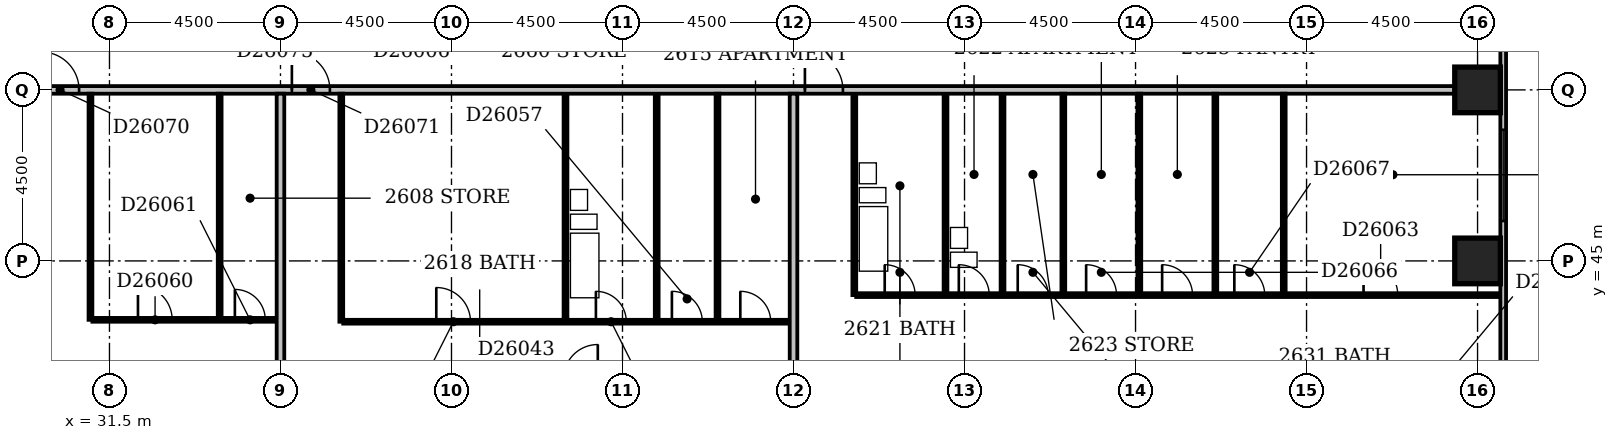
"""IFC4 building model, lengths in metres.
Left out: names, types, materials, properties, quantities, classifications, styles, units other than length and angle.
Written with IfcOpenShell. Run it as: python <this file> out.ifc"""

import sys

from ifc_helpers import new_model, si_unit, direction, frame, frame_2d, origin, origin_2d, place, context, subcontext, project, spatial, rectangle, extrude, element, fill, save


model = new_model("IFC4")
c1 = context("Model", 3, precision=1e-05, world=origin(), true_north=direction((0.0, 1.0)))
c2 = subcontext(c1, "Body", "Model", "MODEL_VIEW")
j1 = project(units=[si_unit("LENGTHUNIT", "METRE"), si_unit("PLANEANGLEUNIT", "RADIAN")], contexts=[c1])
p1 = place(None, origin())
s1 = spatial("IfcSite", under=j1, at=p1, CompositionType="ELEMENT")
p2 = place(p1, origin())
s2 = spatial("IfcBuilding", under=s1, at=p2, CompositionType="ELEMENT")
p3 = place(p2, frame((0.0, 0.0, 104.6)))
s3 = spatial("IfcBuildingStorey", under=s2, at=p3, CompositionType="ELEMENT", Elevation=104.6)
for number, where, z_axis, x_axis in (
    (1, (67.5, 45.0, -0.3), (0.0, 0.0, 1.0), (1.0, 0.0, 0.0)),
    (2, (67.5, 49.5, -0.3), (0.0, 0.0, 1.0), (1.0, 0.0, 0.0)),
):
    element("IfcColumn", number, at=place(p3, frame(where, z_axis=z_axis, x_axis=x_axis)), inside=s3, PredefinedType="COLUMN", context=c2, shape_type="SweptSolid", body=[
        extrude(rectangle(XDim=1.2, YDim=1.2, at=origin_2d()), origin(), (0.0, 0.0, 1.0), 3.45),
    ])
p4 = place(p3, frame((68.175, 35.4, 0.0), z_axis=(0.0, 0.0, 1.0), x_axis=(0.0, 1.0, 0.0)))
e3 = element("IfcWall", 3, at=p4, inside=s3, PredefinedType="STANDARD", context=c2, shape_type="SweptSolid", body=[
    extrude(rectangle(XDim=23.85, YDim=0.15, at=frame_2d((11.925, 0.0))), origin(), (0.0, 0.0, 1.0), 2.5),
])
p5 = place(p4, frame((1.65, 0.0, 0.6)))
e4 = element("IfcOpeningElement", 4, at=p5, cuts=e3, PredefinedType="OPENING", context=c2, shape_type="SweptSolid", body=[
    extrude(rectangle(XDim=2.4, YDim=1.8, at=frame_2d((1.2, 0.9))), frame((0.0, 0.087, 0.0), z_axis=(0.0, -1.0, 0.0), x_axis=(1.0, 0.0, 0.0)), (0.0, 0.0, 1.0), 0.174),
])
p6 = place(p4, frame((10.65, 0.0, 0.6)))
e5 = element("IfcOpeningElement", 5, at=p6, cuts=e3, PredefinedType="OPENING", context=c2, shape_type="SweptSolid", body=[
    extrude(rectangle(XDim=2.4, YDim=1.8, at=frame_2d((1.2, 0.9))), frame((0.0, 0.087, 0.0), z_axis=(0.0, -1.0, 0.0), x_axis=(1.0, 0.0, 0.0)), (0.0, 0.0, 1.0), 0.174),
])
p7 = place(p4, frame((19.65, 0.0, 0.6)))
e6 = element("IfcOpeningElement", 6, at=p7, cuts=e3, PredefinedType="OPENING", context=c2, shape_type="SweptSolid", body=[
    extrude(rectangle(XDim=2.4, YDim=1.8, at=frame_2d((1.2, 0.9))), frame((0.0, 0.087, 0.0), z_axis=(0.0, -1.0, 0.0), x_axis=(1.0, 0.0, 0.0)), (0.0, 0.0, 1.0), 0.174),
])
p8 = place(p3, frame((36.0, 36.6, 0.0), z_axis=(0.0, 0.0, 1.0), x_axis=(0.0, 1.0, 0.0)))
e7 = element("IfcWall", 7, at=p8, inside=s3, PredefinedType="PARTITIONING", context=c2, shape_type="SweptSolid", body=[
    extrude(rectangle(XDim=12.8, YDim=0.2, at=frame_2d((6.4, 0.0))), origin(), (0.0, 0.0, 1.0), 2.25),
])
p9 = place(p3, frame((49.5, 36.6, 0.0), z_axis=(0.0, 0.0, 1.0), x_axis=(0.0, 1.0, 0.0)))
e8 = element("IfcWall", 8, at=p9, inside=s3, PredefinedType="PARTITIONING", context=c2, shape_type="SweptSolid", body=[
    extrude(rectangle(XDim=12.8, YDim=0.2, at=frame_2d((6.4, 0.0))), origin(), (0.0, 0.0, 1.0), 3.15),
])
p10 = place(p3, frame((37.6, 43.4, 0.0), z_axis=(0.0, 0.0, 1.0), x_axis=(0.0, 1.0, 0.0)))
e9 = element("IfcWall", 9, at=p10, inside=s3, PredefinedType="PARTITIONING", context=c2, shape_type="SweptSolid", body=[
    extrude(rectangle(XDim=6.0, YDim=0.1, at=frame_2d((3.0, 0.0))), origin(), (0.0, 0.0, 1.0), 3.15),
])
p11 = place(p3, frame((37.65, 43.4, 0.0), z_axis=(0.0, 0.0, 1.0), x_axis=(1.0, 0.0, 0.0)))
e10 = element("IfcWall", 10, at=p11, inside=s3, PredefinedType="PARTITIONING", context=c2, shape_type="SweptSolid", body=[
    extrude(rectangle(XDim=11.75, YDim=0.1, at=frame_2d((5.875, 0.0))), origin(), (0.0, 0.0, 1.0), 3.15),
])
p12 = place(p11, frame((6.65, 0.0, 0.0)))
e11 = element("IfcOpeningElement", 11, at=p12, cuts=e10, PredefinedType="OPENING", context=c2, shape_type="SweptSolid", body=[
    extrude(rectangle(XDim=0.8, YDim=2.1, at=frame_2d((0.4, 1.05))), frame((0.0, 0.062, 0.0), z_axis=(0.0, -1.0, 0.0), x_axis=(1.0, 0.0, 0.0)), (0.0, 0.0, 1.0), 0.124),
])
p13 = place(p11, frame((2.45, 0.0, 0.0)))
e12 = element("IfcOpeningElement", 12, at=p13, cuts=e10, PredefinedType="OPENING", context=c2, shape_type="SweptSolid", body=[
    extrude(rectangle(XDim=0.9, YDim=2.1, at=frame_2d((0.45, 1.05))), frame((0.0, 0.062, 0.0), z_axis=(0.0, -1.0, 0.0), x_axis=(1.0, 0.0, 0.0)), (0.0, 0.0, 1.0), 0.124),
])
p14 = place(p11, frame((8.65, 0.0, 0.0)))
e13 = element("IfcOpeningElement", 13, at=p14, cuts=e10, PredefinedType="OPENING", context=c2, shape_type="SweptSolid", body=[
    extrude(rectangle(XDim=0.8, YDim=2.1, at=frame_2d((0.4, 1.05))), frame((0.0, 0.062, 0.0), z_axis=(0.0, -1.0, 0.0), x_axis=(1.0, 0.0, 0.0)), (0.0, 0.0, 1.0), 0.124),
])
p15 = place(p11, frame((10.45, 0.0, 0.0)))
e14 = element("IfcOpeningElement", 14, at=p15, cuts=e10, PredefinedType="OPENING", context=c2, shape_type="SweptSolid", body=[
    extrude(rectangle(XDim=0.8, YDim=2.1, at=frame_2d((0.4, 1.05))), frame((0.0, 0.062, 0.0), z_axis=(0.0, -1.0, 0.0), x_axis=(1.0, 0.0, 0.0)), (0.0, 0.0, 1.0), 0.124),
])
p16 = place(p3, frame((31.0, 43.45, 0.0), z_axis=(0.0, 0.0, 1.0), x_axis=(0.0, 1.0, 0.0)))
e15 = element("IfcWall", 15, at=p16, inside=s3, PredefinedType="PARTITIONING", context=c2, shape_type="SweptSolid", body=[
    extrude(rectangle(XDim=5.95, YDim=0.1, at=frame_2d((2.975, 0.0))), origin(), (0.0, 0.0, 1.0), 3.15),
])
p17 = place(p3, frame((31.05, 43.45, 0.0), z_axis=(0.0, 0.0, 1.0), x_axis=(1.0, 0.0, 0.0)))
e16 = element("IfcWall", 16, at=p17, inside=s3, PredefinedType="PARTITIONING", context=c2, shape_type="SweptSolid", body=[
    extrude(rectangle(XDim=4.85, YDim=0.1, at=frame_2d((2.425, 0.0))), origin(), (0.0, 0.0, 1.0), 3.15),
])
p18 = place(p17, frame((1.2, 0.0, 0.0)))
e17 = element("IfcOpeningElement", 17, at=p18, cuts=e16, PredefinedType="OPENING", context=c2, shape_type="SweptSolid", body=[
    extrude(rectangle(XDim=0.9, YDim=2.1, at=frame_2d((0.45, 1.05))), frame((0.0, 0.062, 0.0), z_axis=(0.0, -1.0, 0.0), x_axis=(1.0, 0.0, 0.0)), (0.0, 0.0, 1.0), 0.124),
])
p19 = place(p17, frame((3.75, 0.0, 0.0)))
e18 = element("IfcOpeningElement", 18, at=p19, cuts=e16, PredefinedType="OPENING", context=c2, shape_type="SweptSolid", body=[
    extrude(rectangle(XDim=0.8, YDim=2.1, at=frame_2d((0.4, 1.05))), frame((0.0, 0.062, 0.0), z_axis=(0.0, -1.0, 0.0), x_axis=(1.0, 0.0, 0.0)), (0.0, 0.0, 1.0), 0.124),
])
for number, where, z_axis, x_axis in (
    (19, (43.5, 43.45, 0.0), (0.0, 0.0, 1.0), (0.0, 1.0, 0.0)),
    (20, (45.9, 43.45, 0.0), (0.0, 0.0, 1.0), (0.0, 1.0, 0.0)),
):
    element("IfcWall", number, at=place(p3, frame(where, z_axis=z_axis, x_axis=x_axis)), inside=s3, PredefinedType="PLUMBINGWALL", context=c2, shape_type="SweptSolid", body=[
        extrude(rectangle(XDim=5.95, YDim=0.1, at=frame_2d((2.975, 0.0))), origin(), (0.0, 0.0, 1.0), 3.15),
    ])
p20 = place(p3, frame((47.5, 43.45, 0.0), z_axis=(0.0, 0.0, 1.0), x_axis=(0.0, 1.0, 0.0)))
e21 = element("IfcWall", 21, at=p20, inside=s3, PredefinedType="PARTITIONING", context=c2, shape_type="SweptSolid", body=[
    extrude(rectangle(XDim=5.95, YDim=0.1, at=frame_2d((2.975, 0.0))), origin(), (0.0, 0.0, 1.0), 3.15),
])
p21 = place(p3, frame((34.4, 43.5, 0.0), z_axis=(0.0, 0.0, 1.0), x_axis=(0.0, 1.0, 0.0)))
e22 = element("IfcWall", 22, at=p21, inside=s3, PredefinedType="PARTITIONING", context=c2, shape_type="SweptSolid", body=[
    extrude(rectangle(XDim=5.9, YDim=0.1, at=frame_2d((2.95, 0.0))), origin(), (0.0, 0.0, 1.0), 3.15),
])
p22 = place(p3, frame((51.1, 44.1, 0.0), z_axis=(0.0, 0.0, 1.0), x_axis=(0.0, 1.0, 0.0)))
e23 = element("IfcWall", 23, at=p22, inside=s3, PredefinedType="PLUMBINGWALL", context=c2, shape_type="SweptSolid", body=[
    extrude(rectangle(XDim=5.3, YDim=0.1, at=frame_2d((2.65, 0.0))), origin(), (0.0, 0.0, 1.0), 3.15),
])
p23 = place(p3, frame((51.15, 44.1, 0.0), z_axis=(0.0, 0.0, 1.0), x_axis=(1.0, 0.0, 0.0)))
e24 = element("IfcWall", 24, at=p23, inside=s3, PredefinedType="PARTITIONING", context=c2, shape_type="SweptSolid", body=[
    extrude(rectangle(XDim=16.95, YDim=0.1, at=frame_2d((8.475, 0.0))), origin(), (0.0, 0.0, 1.0), 3.15),
])
p24 = place(p23, frame((0.75, 0.0, 0.0)))
e25 = element("IfcOpeningElement", 25, at=p24, cuts=e24, PredefinedType="OPENING", context=c2, shape_type="SweptSolid", body=[
    extrude(rectangle(XDim=0.8, YDim=2.1, at=frame_2d((0.4, 1.05))), frame((0.0, 0.062, 0.0), z_axis=(0.0, -1.0, 0.0), x_axis=(1.0, 0.0, 0.0)), (0.0, 0.0, 1.0), 0.124),
])
p25 = place(p23, frame((13.35, 0.0, 0.0)))
e26 = element("IfcOpeningElement", 26, at=p25, cuts=e24, PredefinedType="OPENING", context=c2, shape_type="SweptSolid", body=[
    extrude(rectangle(XDim=0.9, YDim=2.1, at=frame_2d((0.45, 1.05))), frame((0.0, 0.062, 0.0), z_axis=(0.0, -1.0, 0.0), x_axis=(1.0, 0.0, 0.0)), (0.0, 0.0, 1.0), 0.124),
])
p26 = place(p23, frame((8.05, 0.0, 0.0)))
e27 = element("IfcOpeningElement", 27, at=p26, cuts=e24, PredefinedType="OPENING", context=c2, shape_type="SweptSolid", body=[
    extrude(rectangle(XDim=0.8, YDim=2.1, at=frame_2d((0.4, 1.05))), frame((0.0, 0.062, 0.0), z_axis=(0.0, -1.0, 0.0), x_axis=(1.0, 0.0, 0.0)), (0.0, 0.0, 1.0), 0.124),
])
p27 = place(p23, frame((4.25, 0.0, 0.0)))
e28 = element("IfcOpeningElement", 28, at=p27, cuts=e24, PredefinedType="OPENING", context=c2, shape_type="SweptSolid", body=[
    extrude(rectangle(XDim=0.8, YDim=2.1, at=frame_2d((0.4, 1.05))), frame((0.0, 0.062, 0.0), z_axis=(0.0, -1.0, 0.0), x_axis=(1.0, 0.0, 0.0)), (0.0, 0.0, 1.0), 0.124),
])
p28 = place(p23, frame((6.05, 0.0, 0.0)))
e29 = element("IfcOpeningElement", 29, at=p28, cuts=e24, PredefinedType="OPENING", context=c2, shape_type="SweptSolid", body=[
    extrude(rectangle(XDim=0.8, YDim=2.1, at=frame_2d((0.4, 1.05))), frame((0.0, 0.062, 0.0), z_axis=(0.0, -1.0, 0.0), x_axis=(1.0, 0.0, 0.0)), (0.0, 0.0, 1.0), 0.124),
])
p29 = place(p23, frame((9.95, 0.0, 0.0)))
e30 = element("IfcOpeningElement", 30, at=p29, cuts=e24, PredefinedType="OPENING", context=c2, shape_type="SweptSolid", body=[
    extrude(rectangle(XDim=0.8, YDim=2.1, at=frame_2d((0.4, 1.05))), frame((0.0, 0.062, 0.0), z_axis=(0.0, -1.0, 0.0), x_axis=(1.0, 0.0, 0.0)), (0.0, 0.0, 1.0), 0.124),
])
p30 = place(p23, frame((2.7, 0.0, 0.0)))
e31 = element("IfcOpeningElement", 31, at=p30, cuts=e24, PredefinedType="OPENING", context=c2, shape_type="SweptSolid", body=[
    extrude(rectangle(XDim=0.8, YDim=2.1, at=frame_2d((0.4, 1.05))), frame((0.0, 0.062, 0.0), z_axis=(0.0, -1.0, 0.0), x_axis=(1.0, 0.0, 0.0)), (0.0, 0.0, 1.0), 0.124),
])
p31 = place(p3, frame((53.5, 44.15, 0.0), z_axis=(0.0, 0.0, 1.0), x_axis=(0.0, 1.0, 0.0)))
e32 = element("IfcWall", 32, at=p31, inside=s3, PredefinedType="PLUMBINGWALL", context=c2, shape_type="SweptSolid", body=[
    extrude(rectangle(XDim=5.25, YDim=0.1, at=frame_2d((2.625, 0.0))), origin(), (0.0, 0.0, 1.0), 2.45),
])
p32 = place(p3, frame((55.0, 44.15, 0.0), z_axis=(0.0, 0.0, 1.0), x_axis=(0.0, 1.0, 0.0)))
e33 = element("IfcWall", 33, at=p32, inside=s3, PredefinedType="PLUMBINGWALL", context=c2, shape_type="SweptSolid", body=[
    extrude(rectangle(XDim=5.25, YDim=0.1, at=frame_2d((2.625, 0.0))), origin(), (0.0, 0.0, 1.0), 3.15),
])
for number, where, z_axis, x_axis in (
    (34, (56.6, 44.15, 0.0), (0.0, 0.0, 1.0), (0.0, 1.0, 0.0)),
    (35, (58.6, 44.15, 0.0), (0.0, 0.0, 1.0), (0.0, 1.0, 0.0)),
    (36, (60.6, 44.15, 0.0), (0.0, 0.0, 1.0), (0.0, 1.0, 0.0)),
):
    element("IfcWall", number, at=place(p3, frame(where, z_axis=z_axis, x_axis=x_axis)), inside=s3, PredefinedType="PARTITIONING", context=c2, shape_type="SweptSolid", body=[
        extrude(rectangle(XDim=5.25, YDim=0.1, at=frame_2d((2.625, 0.0))), origin(), (0.0, 0.0, 1.0), 3.15),
    ])
p33 = place(p3, frame((62.4, 44.15, 0.0), z_axis=(0.0, 0.0, 1.0), x_axis=(0.0, 1.0, 0.0)))
e37 = element("IfcWall", 37, at=p33, inside=s3, PredefinedType="PARTITIONING", context=c2, shape_type="SweptSolid", body=[
    extrude(rectangle(XDim=5.25, YDim=0.1, at=frame_2d((2.625, 0.0))), origin(), (0.0, 0.0, 1.0), 2.25),
])
p34 = place(p3, frame((9.1, 49.5, 0.0), z_axis=(0.0, 0.0, 1.0), x_axis=(1.0, 0.0, 0.0)))
e38 = element("IfcWall", 38, at=p34, inside=s3, PredefinedType="PARTITIONING", context=c2, shape_type="SweptSolid", body=[
    extrude(rectangle(XDim=57.8, YDim=0.2, at=frame_2d((28.9, 0.0))), origin(), (0.0, 0.0, 1.0), 3.15),
])
p35 = place(p34, frame((14.95, 0.0, 0.0)))
e39 = element("IfcOpeningElement", 39, at=p35, cuts=e38, PredefinedType="OPENING", context=c2, shape_type="SweptSolid", body=[
    extrude(rectangle(XDim=1.0, YDim=2.1, at=frame_2d((0.5, 1.05))), frame((0.0, 0.112, 0.0), z_axis=(0.0, -1.0, 0.0), x_axis=(1.0, 0.0, 0.0)), (0.0, 0.0, 1.0), 0.224),
])
p36 = place(p34, frame((20.6, 0.0, 0.0)))
e40 = element("IfcOpeningElement", 40, at=p36, cuts=e38, PredefinedType="OPENING", context=c2, shape_type="SweptSolid", body=[
    extrude(rectangle(XDim=1.0, YDim=2.1, at=frame_2d((0.5, 1.05))), frame((0.0, 0.112, 0.0), z_axis=(0.0, -1.0, 0.0), x_axis=(1.0, 0.0, 0.0)), (0.0, 0.0, 1.0), 0.224),
])
p37 = place(p34, frame((27.2, 0.0, 0.0)))
e41 = element("IfcOpeningElement", 41, at=p37, cuts=e38, PredefinedType="OPENING", context=c2, shape_type="SweptSolid", body=[
    extrude(rectangle(XDim=1.0, YDim=2.1, at=frame_2d((0.5, 1.05))), frame((0.0, 0.112, 0.0), z_axis=(0.0, -1.0, 0.0), x_axis=(1.0, 0.0, 0.0)), (0.0, 0.0, 1.0), 0.224),
])
p38 = place(p34, frame((40.7, 0.0, 0.0)))
e42 = element("IfcOpeningElement", 42, at=p38, cuts=e38, PredefinedType="OPENING", context=c2, shape_type="SweptSolid", body=[
    extrude(rectangle(XDim=1.0, YDim=2.1, at=frame_2d((0.5, 1.05))), frame((0.0, 0.112, 0.0), z_axis=(0.0, -1.0, 0.0), x_axis=(1.0, 0.0, 0.0)), (0.0, 0.0, 1.0), 0.224),
])
p39 = place(p34, frame((10.65, 0.0, 0.0)))
e43 = element("IfcOpeningElement", 43, at=p39, cuts=e38, PredefinedType="OPENING", context=c2, shape_type="SweptSolid", body=[
    extrude(rectangle(XDim=0.9, YDim=2.1, at=frame_2d((0.45, 1.05))), frame((0.0, 0.112, 0.0), z_axis=(0.0, -1.0, 0.0), x_axis=(1.0, 0.0, 0.0)), (0.0, 0.0, 1.0), 0.224),
])
p40 = place(p6, origin())
e44 = element("IfcWindow", 44, at=p40, inside=s3, PartitioningType="SINGLE_PANEL", PredefinedType="WINDOW", context=c2, shape_type="SweptSolid", body=[
    extrude(rectangle(XDim=2.4, YDim=1.8, at=frame_2d((1.2, 0.9))), frame((0.0, 0.03, 0.0), z_axis=(0.0, -1.0, 0.0), x_axis=(1.0, 0.0, 0.0)), (0.0, 0.0, 1.0), 0.06),
])
fill(e5, e44)
p41 = place(p12, origin())
e45 = element("IfcDoor", 45, at=p41, inside=s3, OperationType="SINGLE_SWING_LEFT", PredefinedType="DOOR", context=c2, shape_type="SweptSolid", body=[
    extrude(rectangle(XDim=0.8, YDim=2.1, at=frame_2d((0.4, 1.05))), frame((0.0, 0.025, 0.0), z_axis=(0.0, -1.0, 0.0), x_axis=(1.0, 0.0, 0.0)), (0.0, 0.0, 1.0), 0.05),
])
fill(e11, e45)
p42 = place(p13, origin())
e46 = element("IfcDoor", 46, at=p42, inside=s3, OperationType="SINGLE_SWING_LEFT", PredefinedType="DOOR", context=c2, shape_type="SweptSolid", body=[
    extrude(rectangle(XDim=0.9, YDim=2.1, at=frame_2d((0.45, 1.05))), frame((0.0, 0.025, 0.0), z_axis=(0.0, -1.0, 0.0), x_axis=(1.0, 0.0, 0.0)), (0.0, 0.0, 1.0), 0.05),
])
fill(e12, e46)
p43 = place(p14, origin())
e47 = element("IfcDoor", 47, at=p43, inside=s3, OperationType="SINGLE_SWING_LEFT", PredefinedType="DOOR", context=c2, shape_type="SweptSolid", body=[
    extrude(rectangle(XDim=0.8, YDim=2.1, at=frame_2d((0.4, 1.05))), frame((0.0, 0.025, 0.0), z_axis=(0.0, -1.0, 0.0), x_axis=(1.0, 0.0, 0.0)), (0.0, 0.0, 1.0), 0.05),
])
fill(e13, e47)
p44 = place(p15, origin())
e48 = element("IfcDoor", 48, at=p44, inside=s3, OperationType="SINGLE_SWING_LEFT", PredefinedType="DOOR", context=c2, shape_type="SweptSolid", body=[
    extrude(rectangle(XDim=0.8, YDim=2.1, at=frame_2d((0.4, 1.05))), frame((0.0, 0.025, 0.0), z_axis=(0.0, -1.0, 0.0), x_axis=(1.0, 0.0, 0.0)), (0.0, 0.0, 1.0), 0.05),
])
fill(e14, e48)
p45 = place(p18, origin())
e49 = element("IfcDoor", 49, at=p45, inside=s3, OperationType="SINGLE_SWING_LEFT", PredefinedType="DOOR", context=c2, shape_type="SweptSolid", body=[
    extrude(rectangle(XDim=0.9, YDim=2.1, at=frame_2d((0.45, 1.05))), frame((0.0, 0.025, 0.0), z_axis=(0.0, -1.0, 0.0), x_axis=(1.0, 0.0, 0.0)), (0.0, 0.0, 1.0), 0.05),
])
fill(e17, e49)
p46 = place(p19, origin())
e50 = element("IfcDoor", 50, at=p46, inside=s3, OperationType="SINGLE_SWING_LEFT", PredefinedType="DOOR", context=c2, shape_type="SweptSolid", body=[
    extrude(rectangle(XDim=0.8, YDim=2.1, at=frame_2d((0.4, 1.05))), frame((0.0, 0.025, 0.0), z_axis=(0.0, -1.0, 0.0), x_axis=(1.0, 0.0, 0.0)), (0.0, 0.0, 1.0), 0.05),
])
fill(e18, e50)
p47 = place(p24, origin())
e51 = element("IfcDoor", 51, at=p47, inside=s3, OperationType="SINGLE_SWING_LEFT", PredefinedType="DOOR", context=c2, shape_type="SweptSolid", body=[
    extrude(rectangle(XDim=0.8, YDim=2.1, at=frame_2d((0.4, 1.05))), frame((0.0, 0.025, 0.0), z_axis=(0.0, -1.0, 0.0), x_axis=(1.0, 0.0, 0.0)), (0.0, 0.0, 1.0), 0.05),
])
fill(e25, e51)
p48 = place(p25, origin())
e52 = element("IfcDoor", 52, at=p48, inside=s3, OperationType="SINGLE_SWING_LEFT", PredefinedType="DOOR", context=c2, shape_type="SweptSolid", body=[
    extrude(rectangle(XDim=0.9, YDim=2.1, at=frame_2d((0.45, 1.05))), frame((0.0, 0.025, 0.0), z_axis=(0.0, -1.0, 0.0), x_axis=(1.0, 0.0, 0.0)), (0.0, 0.0, 1.0), 0.05),
])
fill(e26, e52)
p49 = place(p26, origin())
e53 = element("IfcDoor", 53, at=p49, inside=s3, OperationType="SINGLE_SWING_LEFT", PredefinedType="DOOR", context=c2, shape_type="SweptSolid", body=[
    extrude(rectangle(XDim=0.8, YDim=2.1, at=frame_2d((0.4, 1.05))), frame((0.0, 0.025, 0.0), z_axis=(0.0, -1.0, 0.0), x_axis=(1.0, 0.0, 0.0)), (0.0, 0.0, 1.0), 0.05),
])
fill(e27, e53)
p50 = place(p27, origin())
e54 = element("IfcDoor", 54, at=p50, inside=s3, OperationType="SINGLE_SWING_LEFT", PredefinedType="DOOR", context=c2, shape_type="SweptSolid", body=[
    extrude(rectangle(XDim=0.8, YDim=2.1, at=frame_2d((0.4, 1.05))), frame((0.0, 0.025, 0.0), z_axis=(0.0, -1.0, 0.0), x_axis=(1.0, 0.0, 0.0)), (0.0, 0.0, 1.0), 0.05),
])
fill(e28, e54)
p51 = place(p28, origin())
e55 = element("IfcDoor", 55, at=p51, inside=s3, OperationType="SINGLE_SWING_LEFT", PredefinedType="DOOR", context=c2, shape_type="SweptSolid", body=[
    extrude(rectangle(XDim=0.8, YDim=2.1, at=frame_2d((0.4, 1.05))), frame((0.0, 0.025, 0.0), z_axis=(0.0, -1.0, 0.0), x_axis=(1.0, 0.0, 0.0)), (0.0, 0.0, 1.0), 0.05),
])
fill(e29, e55)
p52 = place(p29, origin())
e56 = element("IfcDoor", 56, at=p52, inside=s3, OperationType="SINGLE_SWING_LEFT", PredefinedType="DOOR", context=c2, shape_type="SweptSolid", body=[
    extrude(rectangle(XDim=0.8, YDim=2.1, at=frame_2d((0.4, 1.05))), frame((0.0, 0.025, 0.0), z_axis=(0.0, -1.0, 0.0), x_axis=(1.0, 0.0, 0.0)), (0.0, 0.0, 1.0), 0.05),
])
fill(e30, e56)
p53 = place(p30, origin())
e57 = element("IfcDoor", 57, at=p53, inside=s3, OperationType="SINGLE_SWING_LEFT", PredefinedType="DOOR", context=c2, shape_type="SweptSolid", body=[
    extrude(rectangle(XDim=0.8, YDim=2.1, at=frame_2d((0.4, 1.05))), frame((0.0, 0.025, 0.0), z_axis=(0.0, -1.0, 0.0), x_axis=(1.0, 0.0, 0.0)), (0.0, 0.0, 1.0), 0.05),
])
fill(e31, e57)
p54 = place(p36, origin())
e58 = element("IfcDoor", 58, at=p54, inside=s3, OperationType="SINGLE_SWING_LEFT", PredefinedType="DOOR", context=c2, shape_type="SweptSolid", body=[
    extrude(rectangle(XDim=1.0, YDim=2.1, at=frame_2d((0.5, 1.05))), frame((0.0, 0.025, 0.0), z_axis=(0.0, -1.0, 0.0), x_axis=(1.0, 0.0, 0.0)), (0.0, 0.0, 1.0), 0.05),
])
fill(e40, e58)
p55 = place(p37, origin())
e59 = element("IfcDoor", 59, at=p55, inside=s3, OperationType="SINGLE_SWING_LEFT", PredefinedType="DOOR", context=c2, shape_type="SweptSolid", body=[
    extrude(rectangle(XDim=1.0, YDim=2.1, at=frame_2d((0.5, 1.05))), frame((0.0, 0.025, 0.0), z_axis=(0.0, -1.0, 0.0), x_axis=(1.0, 0.0, 0.0)), (0.0, 0.0, 1.0), 0.05),
])
fill(e41, e59)
p56 = place(p38, origin())
e60 = element("IfcDoor", 60, at=p56, inside=s3, OperationType="SINGLE_SWING_LEFT", PredefinedType="DOOR", context=c2, shape_type="SweptSolid", body=[
    extrude(rectangle(XDim=1.0, YDim=2.1, at=frame_2d((0.5, 1.05))), frame((0.0, 0.025, 0.0), z_axis=(0.0, -1.0, 0.0), x_axis=(1.0, 0.0, 0.0)), (0.0, 0.0, 1.0), 0.05),
])
fill(e42, e60)
save(model, sys.argv[1])
